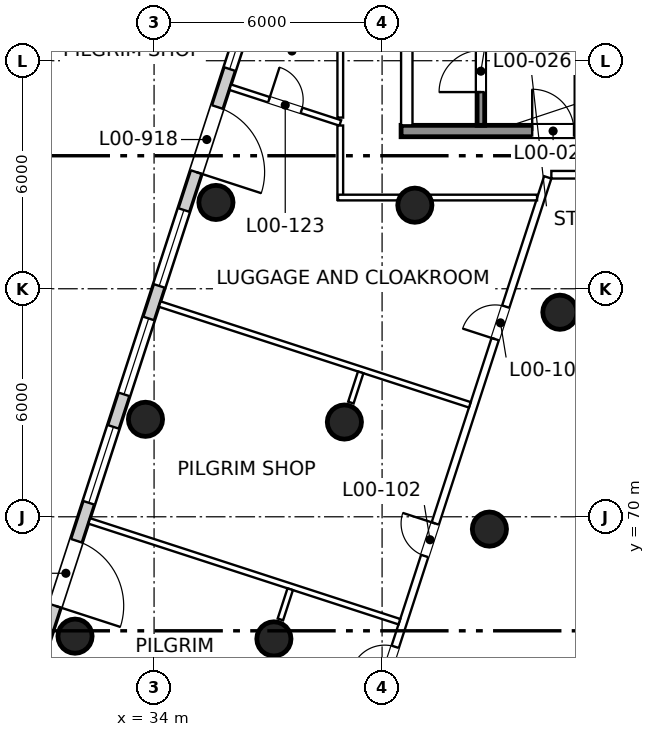
"""IFC4 building model, lengths in metres.
Left out: names, types, materials, properties, quantities, classifications, styles, units other than length and angle.
Written with IfcOpenShell. Run it as: python <this file> out.ifc"""

import sys

from ifc_helpers import new_model, si_unit, direction, frame, frame_2d, origin, origin_2d, place, context, subcontext, project, spatial, rectangle, circle, extrude, element, fill, save


model = new_model("IFC4")
c1 = context("Model", 3, precision=1e-05, world=origin(), true_north=direction((0.0, 1.0)))
c2 = subcontext(c1, "Body", "Model", "MODEL_VIEW")
j1 = project(units=[si_unit("LENGTHUNIT", "METRE"), si_unit("PLANEANGLEUNIT", "RADIAN")], contexts=[c1])
p1 = place(None, origin())
s1 = spatial("IfcSite", under=j1, at=p1, CompositionType="ELEMENT")
p2 = place(p1, origin())
s2 = spatial("IfcBuilding", under=s1, at=p2, CompositionType="ELEMENT")
p3 = place(p2, origin())
s3 = spatial("IfcBuildingStorey", under=s2, at=p3, CompositionType="ELEMENT", Elevation=0.0)
for number, where, z_axis, x_axis in (
    (1, (35.628, 78.271, 0.0), (0.0, 0.0, 1.0), (1.0, 0.0, 0.0)),
    (2, (33.774, 72.565, 0.0), (0.0, 0.0, 1.0), (1.0, 0.0, 0.0)),
    (3, (31.92, 66.859, 0.0), (0.0, 0.0, 1.0), (1.0, 0.0, 0.0)),
    (4, (40.862, 78.199, 0.0), (0.0, 0.0, 1.0), (1.0, 0.0, 0.0)),
    (5, (39.008, 72.493, 0.0), (0.0, 0.0, 1.0), (1.0, 0.0, 0.0)),
    (6, (37.153, 66.787, 0.0), (0.0, 0.0, 1.0), (1.0, 0.0, 0.0)),
    (7, (44.678, 75.382, 0.0), (0.0, 0.0, 1.0), (1.0, 0.0, 0.0)),
    (8, (42.824, 69.676, 0.0), (0.0, 0.0, 1.0), (1.0, 0.0, 0.0)),
):
    element("IfcColumn", number, at=place(p3, frame(where, z_axis=z_axis, x_axis=x_axis)), inside=s3, PredefinedType="COLUMN", context=c2, shape_type="SweptSolid", body=[
        extrude(circle(Radius=0.45, at=origin_2d()), origin(), (0.0, 0.0, 1.0), 9.0),
    ])
p4 = place(p3, frame((37.912, 87.697, 0.0), z_axis=(0.0, 0.0, 1.0), x_axis=(-0.309016476183, -0.951056684666, 0.0)))
e9 = element("IfcWall", 9, at=p4, inside=s3, PredefinedType="SOLIDWALL", context=c2, shape_type="SweptSolid", body=[
    extrude(rectangle(XDim=28.556, YDim=0.32, at=frame_2d((14.278, 0.0))), origin(), (0.0, 0.0, 1.0), 8.65),
])
p5 = place(p4, frame((1.121, 0.0, 0.9)))
e10 = element("IfcOpeningElement", 10, at=p5, cuts=e9, PredefinedType="OPENING", context=c2, shape_type="SweptSolid", body=[
    extrude(rectangle(XDim=2.1, YDim=3.0, at=frame_2d((1.05, 1.5))), frame((0.0, 0.17, 0.0), z_axis=(0.0, -1.0, 0.0), x_axis=(1.0, 0.0, 0.0)), (0.0, 0.0, 1.0), 0.34),
])
p6 = place(p4, frame((4.121, 0.0, 0.9)))
e11 = element("IfcOpeningElement", 11, at=p6, cuts=e9, PredefinedType="OPENING", context=c2, shape_type="SweptSolid", body=[
    extrude(rectangle(XDim=2.1, YDim=3.0, at=frame_2d((1.05, 1.5))), frame((0.0, 0.17, 0.0), z_axis=(0.0, -1.0, 0.0), x_axis=(1.0, 0.0, 0.0)), (0.0, 0.0, 1.0), 0.34),
])
p7 = place(p4, frame((7.271, 0.0, 0.0)))
e12 = element("IfcOpeningElement", 12, at=p7, cuts=e9, PredefinedType="OPENING", context=c2, shape_type="SweptSolid", body=[
    extrude(rectangle(XDim=1.8, YDim=2.4, at=frame_2d((0.9, 1.2))), frame((0.0, 0.17, 0.0), z_axis=(0.0, -1.0, 0.0), x_axis=(1.0, 0.0, 0.0)), (0.0, 0.0, 1.0), 0.34),
])
p8 = place(p4, frame((10.121, 0.0, 0.9)))
e13 = element("IfcOpeningElement", 13, at=p8, cuts=e9, PredefinedType="OPENING", context=c2, shape_type="SweptSolid", body=[
    extrude(rectangle(XDim=2.1, YDim=3.0, at=frame_2d((1.05, 1.5))), frame((0.0, 0.17, 0.0), z_axis=(0.0, -1.0, 0.0), x_axis=(1.0, 0.0, 0.0)), (0.0, 0.0, 1.0), 0.34),
])
p9 = place(p4, frame((13.121, 0.0, 0.9)))
e14 = element("IfcOpeningElement", 14, at=p9, cuts=e9, PredefinedType="OPENING", context=c2, shape_type="SweptSolid", body=[
    extrude(rectangle(XDim=2.1, YDim=3.0, at=frame_2d((1.05, 1.5))), frame((0.0, 0.17, 0.0), z_axis=(0.0, -1.0, 0.0), x_axis=(1.0, 0.0, 0.0)), (0.0, 0.0, 1.0), 0.34),
])
p10 = place(p4, frame((16.121, 0.0, 0.9)))
e15 = element("IfcOpeningElement", 15, at=p10, cuts=e9, PredefinedType="OPENING", context=c2, shape_type="SweptSolid", body=[
    extrude(rectangle(XDim=2.1, YDim=3.0, at=frame_2d((1.05, 1.5))), frame((0.0, 0.17, 0.0), z_axis=(0.0, -1.0, 0.0), x_axis=(1.0, 0.0, 0.0)), (0.0, 0.0, 1.0), 0.34),
])
p11 = place(p4, frame((19.271, 0.0, 0.0)))
e16 = element("IfcOpeningElement", 16, at=p11, cuts=e9, PredefinedType="OPENING", context=c2, shape_type="SweptSolid", body=[
    extrude(rectangle(XDim=1.8, YDim=2.4, at=frame_2d((0.9, 1.2))), frame((0.0, 0.17, 0.0), z_axis=(0.0, -1.0, 0.0), x_axis=(1.0, 0.0, 0.0)), (0.0, 0.0, 1.0), 0.34),
])
p12 = place(p4, frame((22.121, 0.0, 0.9)))
e17 = element("IfcOpeningElement", 17, at=p12, cuts=e9, PredefinedType="OPENING", context=c2, shape_type="SweptSolid", body=[
    extrude(rectangle(XDim=2.1, YDim=3.0, at=frame_2d((1.05, 1.5))), frame((0.0, 0.17, 0.0), z_axis=(0.0, -1.0, 0.0), x_axis=(1.0, 0.0, 0.0)), (0.0, 0.0, 1.0), 0.34),
])
p13 = place(p4, frame((25.121, 0.0, 0.9)))
e18 = element("IfcOpeningElement", 18, at=p13, cuts=e9, PredefinedType="OPENING", context=c2, shape_type="SweptSolid", body=[
    extrude(rectangle(XDim=2.1, YDim=3.0, at=frame_2d((1.05, 1.5))), frame((0.0, 0.17, 0.0), z_axis=(0.0, -1.0, 0.0), x_axis=(1.0, 0.0, 0.0)), (0.0, 0.0, 1.0), 0.34),
])
p14 = place(p3, frame((40.5, 80.15, 0.0), z_axis=(0.0, 0.0, 1.0), x_axis=(1.0, 0.0, 0.0)))
e19 = element("IfcWall", 19, at=p14, inside=s3, PredefinedType="SHEAR", context=c2, shape_type="SweptSolid", body=[
    extrude(rectangle(XDim=13.9, YDim=0.3, at=frame_2d((6.95, 0.0))), origin(), (0.0, 0.0, 1.0), 9.0),
])
p15 = place(p14, frame((3.45, 0.0, 0.0)))
e20 = element("IfcOpeningElement", 20, at=p15, cuts=e19, PredefinedType="OPENING", context=c2, shape_type="SweptSolid", body=[
    extrude(rectangle(XDim=1.1, YDim=2.1, at=frame_2d((0.55, 1.05))), frame((0.0, 0.16, 0.0), z_axis=(0.0, -1.0, 0.0), x_axis=(1.0, 0.0, 0.0)), (0.0, 0.0, 1.0), 0.32),
])
p16 = place(p3, frame((40.65, 80.3, 0.0), z_axis=(0.0, 0.0, 1.0), x_axis=(0.0, 1.0, 0.0)))
e21 = element("IfcWall", 21, at=p16, inside=s3, PredefinedType="PARTITIONING", context=c2, shape_type="SweptSolid", body=[
    extrude(rectangle(XDim=7.36, YDim=0.3, at=frame_2d((3.68, 0.0))), origin(), (0.0, 0.0, 1.0), 7.95),
])
p17 = place(p3, frame((42.6, 80.3, 0.0), z_axis=(0.0, 0.0, 1.0), x_axis=(0.0, 1.0, 0.0)))
e22 = element("IfcWall", 22, at=p17, inside=s3, PredefinedType="SHEAR", context=c2, shape_type="SweptSolid", body=[
    extrude(rectangle(XDim=3.35, YDim=0.2, at=frame_2d((1.675, 0.0))), origin(), (0.0, 0.0, 1.0), 9.0),
])
p18 = place(p17, frame((0.875, 0.0, 0.0)))
e23 = element("IfcOpeningElement", 23, at=p18, cuts=e22, PredefinedType="OPENING", context=c2, shape_type="SweptSolid", body=[
    extrude(rectangle(XDim=1.1, YDim=2.1, at=frame_2d((0.55, 1.05))), frame((0.0, 0.11, 0.0), z_axis=(0.0, -1.0, 0.0), x_axis=(1.0, 0.0, 0.0)), (0.0, 0.0, 1.0), 0.22),
])
p19 = place(p3, frame((38.884, 62.081, 0.0), z_axis=(0.0, 0.0, 1.0), x_axis=(0.309013160516, 0.951057761983, 0.0)))
e24 = element("IfcWall", 24, at=p19, inside=s3, PredefinedType="PARTITIONING", context=c2, shape_type="SweptSolid", body=[
    extrude(rectangle(XDim=17.717, YDim=0.2, at=frame_2d((8.859, 0.0))), origin(), (0.0, 0.0, 1.0), 8.65),
])
p20 = place(p19, frame((13.242, 0.0, 0.0)))
e25 = element("IfcOpeningElement", 25, at=p20, cuts=e24, PredefinedType="OPENING", context=c2, shape_type="SweptSolid", body=[
    extrude(rectangle(XDim=0.9, YDim=2.1, at=frame_2d((0.45, 1.05))), frame((0.0, 0.11, 0.0), z_axis=(0.0, -1.0, 0.0), x_axis=(1.0, 0.0, 0.0)), (0.0, 0.0, 1.0), 0.22),
])
p21 = place(p19, frame((7.242, 0.0, 0.0)))
e26 = element("IfcOpeningElement", 26, at=p21, cuts=e24, PredefinedType="OPENING", context=c2, shape_type="SweptSolid", body=[
    extrude(rectangle(XDim=0.9, YDim=2.1, at=frame_2d((0.45, 1.05))), frame((0.0, 0.11, 0.0), z_axis=(0.0, -1.0, 0.0), x_axis=(1.0, 0.0, 0.0)), (0.0, 0.0, 1.0), 0.22),
])
p22 = place(p19, frame((3.83, 0.0, 0.0)))
e27 = element("IfcOpeningElement", 27, at=p22, cuts=e24, PredefinedType="OPENING", context=c2, shape_type="SweptSolid", body=[
    extrude(rectangle(XDim=0.9, YDim=2.1, at=frame_2d((0.45, 1.05))), frame((0.0, 0.11, 0.0), z_axis=(0.0, -1.0, 0.0), x_axis=(1.0, 0.0, 0.0)), (0.0, 0.0, 1.0), 0.22),
])
p23 = place(p3, frame((44.454, 79.0, 0.0), z_axis=(0.0, 0.0, 1.0), x_axis=(1.0, 0.0, 0.0)))
e28 = element("IfcWall", 28, at=p23, inside=s3, PredefinedType="PARTITIONING", context=c2, shape_type="SweptSolid", body=[
    extrude(rectangle(XDim=12.346, YDim=0.2, at=frame_2d((6.173, 0.0))), origin(), (0.0, 0.0, 1.0), 7.95),
])
p24 = place(p3, frame((36.003, 81.304, 0.0), z_axis=(0.0, 0.0, 1.0), x_axis=(0.951037013891, -0.309077010161, 0.0)))
e29 = element("IfcWall", 29, at=p24, inside=s3, PredefinedType="PARTITIONING", context=c2, shape_type="SweptSolid", body=[
    extrude(rectangle(XDim=3.046, YDim=0.15, at=frame_2d((1.523, 0.0))), origin(), (0.0, 0.0, 1.0), 7.95),
])
p25 = place(p24, frame((1.073, 0.0, 0.0)))
e30 = element("IfcOpeningElement", 30, at=p25, cuts=e29, PredefinedType="OPENING", context=c2, shape_type="SweptSolid", body=[
    extrude(rectangle(XDim=0.9, YDim=2.1, at=frame_2d((0.45, 1.05))), frame((0.0, 0.085, 0.0), z_axis=(0.0, -1.0, 0.0), x_axis=(1.0, 0.0, 0.0)), (0.0, 0.0, 1.0), 0.17),
])
p26 = place(p3, frame((34.149, 75.597, 0.0), z_axis=(0.0, 0.0, 1.0), x_axis=(0.951046405378, -0.309048110846, 0.0)))
e31 = element("IfcWall", 31, at=p26, inside=s3, PredefinedType="PARTITIONING", context=c2, shape_type="SweptSolid", body=[
    extrude(rectangle(XDim=8.58, YDim=0.15, at=frame_2d((4.29, 0.0))), origin(), (0.0, 0.0, 1.0), 7.95),
])
p27 = place(p3, frame((32.295, 69.891, 0.0), z_axis=(0.0, 0.0, 1.0), x_axis=(0.951057485731, -0.309014010742, 0.0)))
e32 = element("IfcWall", 32, at=p27, inside=s3, PredefinedType="PARTITIONING", context=c2, shape_type="SweptSolid", body=[
    extrude(rectangle(XDim=8.58, YDim=0.15, at=frame_2d((4.29, 0.0))), origin(), (0.0, 0.0, 1.0), 7.95),
])
for number, where, z_axis, x_axis in (
    (33, (39.179, 73.005, 0.0), (0.0, 0.0, 1.0), (0.309, 0.951, 0.0)),
    (34, (37.324, 67.299, 0.0), (0.0, 0.0, 1.0), (0.309, 0.951, 0.0)),
):
    element("IfcWall", number, at=place(p3, frame(where, z_axis=z_axis, x_axis=x_axis)), inside=s3, PredefinedType="PARTITIONING", context=c2, shape_type="SweptSolid", body=[
        extrude(rectangle(XDim=0.836, YDim=0.15, at=frame_2d((0.418, 0.0))), origin(), (0.0, 0.0, 1.0), 7.95),
    ])
p28 = place(p3, frame((38.9, 80.296, 0.0), z_axis=(0.0, 0.0, 1.0), x_axis=(0.0, -1.0, 0.0)))
e35 = element("IfcWall", 35, at=p28, inside=s3, PredefinedType="PARTITIONING", context=c2, shape_type="SweptSolid", body=[
    extrude(rectangle(XDim=1.956, YDim=0.15, at=frame_2d((0.978, 0.0))), origin(), (0.0, 0.0, 1.0), 8.65),
])
p29 = place(p3, frame((38.84, 78.4, 0.0), z_axis=(0.0, 0.0, 1.0), x_axis=(1.0, 0.0, 0.0)))
e36 = element("IfcWall", 36, at=p29, inside=s3, PredefinedType="PARTITIONING", context=c2, shape_type="SweptSolid", body=[
    extrude(rectangle(XDim=5.238, YDim=0.15, at=frame_2d((2.619, 0.0))), origin(), (0.0, 0.0, 1.0), 7.95),
])
p30 = place(p3, frame((38.9, 87.55, 0.0), z_axis=(0.0, 0.0, 1.0), x_axis=(0.0, -1.0, 0.0)))
e37 = element("IfcWall", 37, at=p30, inside=s3, PredefinedType="PARTITIONING", context=c2, shape_type="SweptSolid", body=[
    extrude(rectangle(XDim=7.046, YDim=0.15, at=frame_2d((3.523, 0.0))), origin(), (0.0, 0.0, 1.0), 8.65),
])
p31 = place(p6, origin())
e38 = element("IfcWindow", 38, at=p31, inside=s3, PartitioningType="SINGLE_PANEL", PredefinedType="WINDOW", context=c2, shape_type="SweptSolid", body=[
    extrude(rectangle(XDim=2.1, YDim=3.0, at=frame_2d((1.05, 1.5))), frame((0.0, 0.07, 0.0), z_axis=(0.0, -1.0, 0.0), x_axis=(1.0, 0.0, 0.0)), (0.0, 0.0, 1.0), 0.06),
])
fill(e11, e38)
p32 = place(p7, origin())
e39 = element("IfcDoor", 39, at=p32, inside=s3, OperationType="DOUBLE_DOOR_DOUBLE_SWING", PredefinedType="DOOR", context=c2, shape_type="SweptSolid", body=[
    extrude(rectangle(XDim=1.8, YDim=2.4, at=frame_2d((0.9, 1.2))), frame((0.0, 0.04, 0.0), z_axis=(0.0, -1.0, 0.0), x_axis=(1.0, 0.0, 0.0)), (0.0, 0.0, 1.0), 0.05),
])
fill(e12, e39)
p33 = place(p8, origin())
e40 = element("IfcWindow", 40, at=p33, inside=s3, PartitioningType="SINGLE_PANEL", PredefinedType="WINDOW", context=c2, shape_type="SweptSolid", body=[
    extrude(rectangle(XDim=2.1, YDim=3.0, at=frame_2d((1.05, 1.5))), frame((0.0, 0.07, 0.0), z_axis=(0.0, -1.0, 0.0), x_axis=(1.0, 0.0, 0.0)), (0.0, 0.0, 1.0), 0.06),
])
fill(e13, e40)
p34 = place(p9, origin())
e41 = element("IfcWindow", 41, at=p34, inside=s3, PartitioningType="SINGLE_PANEL", PredefinedType="WINDOW", context=c2, shape_type="SweptSolid", body=[
    extrude(rectangle(XDim=2.1, YDim=3.0, at=frame_2d((1.05, 1.5))), frame((0.0, 0.07, 0.0), z_axis=(0.0, -1.0, 0.0), x_axis=(1.0, 0.0, 0.0)), (0.0, 0.0, 1.0), 0.06),
])
fill(e14, e41)
p35 = place(p10, origin())
e42 = element("IfcWindow", 42, at=p35, inside=s3, PartitioningType="SINGLE_PANEL", PredefinedType="WINDOW", context=c2, shape_type="SweptSolid", body=[
    extrude(rectangle(XDim=2.1, YDim=3.0, at=frame_2d((1.05, 1.5))), frame((0.0, 0.07, 0.0), z_axis=(0.0, -1.0, 0.0), x_axis=(1.0, 0.0, 0.0)), (0.0, 0.0, 1.0), 0.06),
])
fill(e15, e42)
p36 = place(p11, origin())
e43 = element("IfcDoor", 43, at=p36, inside=s3, OperationType="DOUBLE_DOOR_DOUBLE_SWING", PredefinedType="DOOR", context=c2, shape_type="SweptSolid", body=[
    extrude(rectangle(XDim=1.8, YDim=2.4, at=frame_2d((0.9, 1.2))), frame((0.0, 0.04, 0.0), z_axis=(0.0, -1.0, 0.0), x_axis=(1.0, 0.0, 0.0)), (0.0, 0.0, 1.0), 0.05),
])
fill(e16, e43)
p37 = place(p15, origin())
e44 = element("IfcDoor", 44, at=p37, inside=s3, OperationType="SINGLE_SWING_LEFT", PredefinedType="DOOR", context=c2, shape_type="SweptSolid", body=[
    extrude(rectangle(XDim=1.1, YDim=2.1, at=frame_2d((0.55, 1.05))), frame((0.0, 0.025, 0.0), z_axis=(0.0, -1.0, 0.0), x_axis=(1.0, 0.0, 0.0)), (0.0, 0.0, 1.0), 0.05),
])
fill(e20, e44)
p38 = place(p18, origin())
e45 = element("IfcDoor", 45, at=p38, inside=s3, OperationType="SINGLE_SWING_LEFT", PredefinedType="DOOR", context=c2, shape_type="SweptSolid", body=[
    extrude(rectangle(XDim=1.1, YDim=2.1, at=frame_2d((0.55, 1.05))), frame((0.0, 0.025, 0.0), z_axis=(0.0, -1.0, 0.0), x_axis=(1.0, 0.0, 0.0)), (0.0, 0.0, 1.0), 0.05),
])
fill(e23, e45)
p39 = place(p20, origin())
e46 = element("IfcDoor", 46, at=p39, inside=s3, OperationType="SINGLE_SWING_LEFT", PredefinedType="DOOR", context=c2, shape_type="SweptSolid", body=[
    extrude(rectangle(XDim=0.9, YDim=2.1, at=frame_2d((0.45, 1.05))), frame((0.0, 0.025, 0.0), z_axis=(0.0, -1.0, 0.0), x_axis=(1.0, 0.0, 0.0)), (0.0, 0.0, 1.0), 0.05),
])
fill(e25, e46)
p40 = place(p21, origin())
e47 = element("IfcDoor", 47, at=p40, inside=s3, OperationType="SINGLE_SWING_RIGHT", PredefinedType="DOOR", context=c2, shape_type="SweptSolid", body=[
    extrude(rectangle(XDim=0.9, YDim=2.1, at=frame_2d((0.45, 1.05))), frame((0.0, 0.025, 0.0), z_axis=(0.0, -1.0, 0.0), x_axis=(1.0, 0.0, 0.0)), (0.0, 0.0, 1.0), 0.05),
])
fill(e26, e47)
p41 = place(p22, origin())
e48 = element("IfcDoor", 48, at=p41, inside=s3, OperationType="SINGLE_SWING_LEFT", PredefinedType="DOOR", context=c2, shape_type="SweptSolid", body=[
    extrude(rectangle(XDim=0.9, YDim=2.1, at=frame_2d((0.45, 1.05))), frame((0.0, 0.025, 0.0), z_axis=(0.0, -1.0, 0.0), x_axis=(1.0, 0.0, 0.0)), (0.0, 0.0, 1.0), 0.05),
])
fill(e27, e48)
p42 = place(p25, origin())
e49 = element("IfcDoor", 49, at=p42, inside=s3, OperationType="SINGLE_SWING_LEFT", PredefinedType="DOOR", context=c2, shape_type="SweptSolid", body=[
    extrude(rectangle(XDim=0.9, YDim=2.1, at=frame_2d((0.45, 1.05))), frame((0.0, 0.025, 0.0), z_axis=(0.0, -1.0, 0.0), x_axis=(1.0, 0.0, 0.0)), (0.0, 0.0, 1.0), 0.05),
])
fill(e30, e49)
save(model, sys.argv[1])
